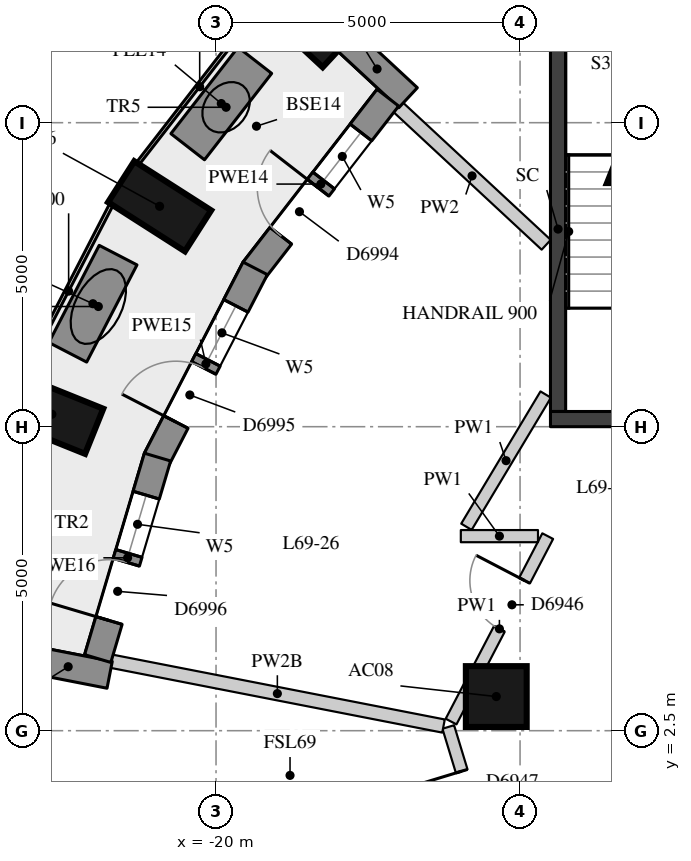
"""IFC4 building model, lengths in metres.
Left out: names, types, materials, properties, quantities, classifications, styles, units other than length and angle.
Written with IfcOpenShell. Run it as: python <this file> out.ifc"""

import sys

from ifc_helpers import new_model, si_unit, direction, frame, frame_2d, origin, origin_2d, place, context, subcontext, project, spatial, rectangle, extrude, element, fill, save


model = new_model("IFC4")
c1 = context("Model", 3, precision=1e-05, world=origin(), true_north=direction((0.0, 1.0)))
c2 = subcontext(c1, "Body", "Model", "MODEL_VIEW")
j1 = project(units=[si_unit("LENGTHUNIT", "METRE"), si_unit("PLANEANGLEUNIT", "RADIAN")], contexts=[c1])
p1 = place(None, origin())
s1 = spatial("IfcSite", under=j1, at=p1, CompositionType="ELEMENT")
p2 = place(p1, origin())
s2 = spatial("IfcBuilding", under=s1, at=p2, CompositionType="ELEMENT")
p3 = place(p2, frame((0.0, 0.0, 243.2)))
s3 = spatial("IfcBuildingStorey", under=s2, at=p3, CompositionType="ELEMENT", Elevation=243.2)
for number, where, z_axis, x_axis in (
    (1, (-18.523, 14.216, 0.0), (0.0, 0.0, 1.0), (-0.733, 0.681, 0.0)),
    (2, (-20.928, 11.125, 0.0), (0.0, 0.0, 1.0), (-0.843, 0.539, 0.0)),
    (3, (-22.7, 7.705, 0.0), (0.0, 0.0, 1.0), (-0.928, 0.374, 0.0)),
):
    element("IfcColumn", number, at=place(p3, frame(where, z_axis=z_axis, x_axis=x_axis)), inside=s3, PredefinedType="COLUMN", context=c2, shape_type="SweptSolid", body=[
        extrude(rectangle(XDim=1.5, YDim=0.8, at=origin_2d()), origin(), (0.0, 0.0, 1.0), 3.3),
    ])
p4 = place(p3, frame((-15.391, 3.062, 0.0), z_axis=(0.0, 0.0, 1.0), x_axis=(1.0, 0.0, 0.0)))
e4 = element("IfcColumn", 4, at=p4, inside=s3, PredefinedType="COLUMN", context=c2, shape_type="SweptSolid", body=[
    extrude(rectangle(XDim=1.0, YDim=1.0, at=origin_2d()), origin(), (0.0, 0.0, 1.0), 3.3),
])
p5 = place(p3, frame((-17.861, 13.857, 0.0), z_axis=(0.0, 0.0, 1.0), x_axis=(0.732605925603, -0.680653037731, 0.0)))
e5 = element("IfcWall", 5, at=p5, inside=s3, PredefinedType="SOLIDWALL", context=c2, shape_type="SweptSolid", body=[
    extrude(rectangle(XDim=1.391, YDim=0.45, at=frame_2d((0.695, 0.0))), origin(), (0.0, 0.0, 1.0), 3.02),
])
p6 = place(p3, frame((-23.114, 3.685, 0.0), z_axis=(0.0, 0.0, 1.0), x_axis=(0.981468844755, -0.191621780535, 0.0)))
e6 = element("IfcWall", 6, at=p6, inside=s3, PredefinedType="SOLIDWALL", context=c2, shape_type="SweptSolid", body=[
    extrude(rectangle(XDim=1.39, YDim=0.45, at=frame_2d((0.695, 0.0))), origin(), (0.0, 0.0, 1.0), 2.57),
])
p7 = place(p3, frame((-17.174, 12.911, 0.0), z_axis=(0.0, 0.0, 1.0), x_axis=(-0.612774197557, -0.79025804824, 0.0)))
e7 = element("IfcWall", 7, at=p7, inside=s3, PredefinedType="SOLIDWALL", context=c2, shape_type="SweptSolid", body=[
    extrude(rectangle(XDim=3.596, YDim=0.45, at=frame_2d((1.798, 0.0))), origin(), (0.0, 0.0, 1.0), 3.02),
])
p8 = place(p7, frame((0.723, 0.0, 0.4)))
e8 = element("IfcOpeningElement", 8, at=p8, cuts=e7, PredefinedType="OPENING", context=c2, shape_type="SweptSolid", body=[
    extrude(rectangle(XDim=1.0, YDim=1.75, at=frame_2d((0.5, 0.875))), frame((0.0, 0.235, 0.0), z_axis=(0.0, -1.0, 0.0), x_axis=(1.0, 0.0, 0.0)), (0.0, 0.0, 1.0), 0.47),
])
p9 = place(p7, frame((1.873, 0.0, 0.0)))
e9 = element("IfcOpeningElement", 9, at=p9, cuts=e7, PredefinedType="OPENING", context=c2, shape_type="SweptSolid", body=[
    extrude(rectangle(XDim=1.0, YDim=2.15, at=frame_2d((0.5, 1.075))), frame((0.0, 0.235, 0.0), z_axis=(0.0, -1.0, 0.0), x_axis=(1.0, 0.0, 0.0)), (0.0, 0.0, 1.0), 0.47),
])
p10 = place(p3, frame((-19.355, 10.104, 0.0), z_axis=(0.0, 0.0, 1.0), x_axis=(-0.458852093952, -0.888512665006, 0.0)))
e10 = element("IfcWall", 10, at=p10, inside=s3, PredefinedType="SOLIDWALL", context=c2, shape_type="SweptSolid", body=[
    extrude(rectangle(XDim=3.538, YDim=0.45, at=frame_2d((1.769, 0.0))), origin(), (0.0, 0.0, 1.0), 3.02),
])
p11 = place(p10, frame((0.694, 0.0, 0.4)))
e11 = element("IfcOpeningElement", 11, at=p11, cuts=e10, PredefinedType="OPENING", context=c2, shape_type="SweptSolid", body=[
    extrude(rectangle(XDim=1.0, YDim=1.75, at=frame_2d((0.5, 0.875))), frame((0.0, 0.235, 0.0), z_axis=(0.0, -1.0, 0.0), x_axis=(1.0, 0.0, 0.0)), (0.0, 0.0, 1.0), 0.47),
])
p12 = place(p10, frame((1.844, 0.0, 0.0)))
e12 = element("IfcOpeningElement", 12, at=p12, cuts=e10, PredefinedType="OPENING", context=c2, shape_type="SweptSolid", body=[
    extrude(rectangle(XDim=1.0, YDim=2.15, at=frame_2d((0.5, 1.075))), frame((0.0, 0.235, 0.0), z_axis=(0.0, -1.0, 0.0), x_axis=(1.0, 0.0, 0.0)), (0.0, 0.0, 1.0), 0.47),
])
p13 = place(p3, frame((-20.963, 7.0, 0.0), z_axis=(0.0, 0.0, 1.0), x_axis=(-0.284437019833, -0.958694728132, 0.0)))
e13 = element("IfcWall", 13, at=p13, inside=s3, PredefinedType="SOLIDWALL", context=c2, shape_type="SweptSolid", body=[
    extrude(rectangle(XDim=3.457, YDim=0.45, at=frame_2d((1.728, 0.0))), origin(), (0.0, 0.0, 1.0), 3.02),
])
p14 = place(p13, frame((0.653, 0.0, 0.4)))
e14 = element("IfcOpeningElement", 14, at=p14, cuts=e13, PredefinedType="OPENING", context=c2, shape_type="SweptSolid", body=[
    extrude(rectangle(XDim=1.0, YDim=1.75, at=frame_2d((0.5, 0.875))), frame((0.0, 0.235, 0.0), z_axis=(0.0, -1.0, 0.0), x_axis=(1.0, 0.0, 0.0)), (0.0, 0.0, 1.0), 0.47),
])
p15 = place(p13, frame((1.803, 0.0, 0.0)))
e15 = element("IfcOpeningElement", 15, at=p15, cuts=e13, PredefinedType="OPENING", context=c2, shape_type="SweptSolid", body=[
    extrude(rectangle(XDim=1.0, YDim=2.15, at=frame_2d((0.5, 1.075))), frame((0.0, 0.235, 0.0), z_axis=(0.0, -1.0, 0.0), x_axis=(1.0, 0.0, 0.0)), (0.0, 0.0, 1.0), 0.47),
])
for number, where, z_axis, x_axis in (
    (16, (-19.361, 13.525, 0.0), (0.0, 0.0, 1.0), (-0.614, -0.789, 0.0)),
    (17, (-21.611, 10.322, 0.0), (0.0, 0.0, 1.0), (-0.46, -0.888, 0.0)),
):
    element("IfcWall", number, at=place(p3, frame(where, z_axis=z_axis, x_axis=x_axis)), inside=s3, PredefinedType="USERDEFINED", context=c2, shape_type="SweptSolid", body=[
        extrude(rectangle(XDim=1.8, YDim=0.7, at=frame_2d((0.9, 0.0))), origin(), (0.0, 0.0, 1.0), 0.75),
    ])
p16 = place(p3, frame((-14.375, 7.75, -0.28), z_axis=(0.0, 0.0, 1.0), x_axis=(0.0, 1.0, 0.0)))
e18 = element("IfcWall", 18, at=p16, inside=s3, PredefinedType="SHEAR", context=c2, shape_type="SweptSolid", body=[
    extrude(rectangle(XDim=6.0, YDim=0.25, at=frame_2d((3.0, 0.0))), origin(), (0.0, 0.0, 1.0), 3.3),
])
p17 = place(p3, frame((-14.5, 7.625, -0.28), z_axis=(0.0, 0.0, 1.0), x_axis=(1.0, 0.0, 0.0)))
e19 = element("IfcWall", 19, at=p17, inside=s3, PredefinedType="SHEAR", context=c2, shape_type="SweptSolid", body=[
    extrude(rectangle(XDim=5.2, YDim=0.25, at=frame_2d((2.6, 0.0))), origin(), (0.0, 0.0, 1.0), 3.3),
])
p18 = place(p3, frame((-13.707, -5.567, 0.0), z_axis=(0.0, 0.0, 1.0), x_axis=(-0.29116047228, 0.956674228451, 0.0)))
e20 = element("IfcWall", 20, at=p18, inside=s3, PredefinedType="PARTITIONING", context=c2, shape_type="SweptSolid", body=[
    extrude(rectangle(XDim=8.496, YDim=0.2, at=frame_2d((4.248, 0.0))), origin(), (0.0, 0.0, 1.0), 3.02),
])
p19 = place(p18, frame((6.836, 0.0, 0.0)))
e21 = element("IfcOpeningElement", 21, at=p19, cuts=e20, PredefinedType="OPENING", context=c2, shape_type="SweptSolid", body=[
    extrude(rectangle(XDim=0.9, YDim=2.1, at=frame_2d((0.45, 1.05))), frame((0.0, 0.11, 0.0), z_axis=(0.0, -1.0, 0.0), x_axis=(1.0, 0.0, 0.0)), (0.0, 0.0, 1.0), 0.22),
])
p20 = place(p3, frame((-16.134, 2.65, 0.0), z_axis=(0.0, 0.0, 1.0), x_axis=(0.462143812638, 0.886804993468, 0.0)))
e22 = element("IfcWall", 22, at=p20, inside=s3, PredefinedType="PARTITIONING", context=c2, shape_type="SweptSolid", body=[
    extrude(rectangle(XDim=3.439, YDim=0.2, at=frame_2d((1.72, 0.0))), origin(), (0.0, 0.0, 1.0), 3.02),
])
p21 = place(p20, frame((1.716, 0.0, 0.0)))
e23 = element("IfcOpeningElement", 23, at=p21, cuts=e22, PredefinedType="OPENING", context=c2, shape_type="SweptSolid", body=[
    extrude(rectangle(XDim=0.9, YDim=2.1, at=frame_2d((0.45, 1.05))), frame((0.0, 0.11, 0.0), z_axis=(0.0, -1.0, 0.0), x_axis=(1.0, 0.0, 0.0)), (0.0, 0.0, 1.0), 0.22),
])
p22 = place(p3, frame((-14.705, 5.7, 0.0), z_axis=(0.0, 0.0, 1.0), x_axis=(-1.0, 0.0, 0.0)))
e24 = element("IfcWall", 24, at=p22, inside=s3, PredefinedType="PARTITIONING", context=c2, shape_type="SweptSolid", body=[
    extrude(rectangle(XDim=1.269, YDim=0.2, at=frame_2d((0.635, 0.0))), origin(), (0.0, 0.0, 1.0), 3.02),
])
p23 = place(p3, frame((-15.882, 5.854, 0.0), z_axis=(0.0, 0.0, 1.0), x_axis=(0.514042598012, 0.857764657368, 0.0)))
e25 = element("IfcWall", 25, at=p23, inside=s3, PredefinedType="PARTITIONING", context=c2, shape_type="SweptSolid", body=[
    extrude(rectangle(XDim=2.536, YDim=0.2, at=frame_2d((1.268, 0.0))), origin(), (0.0, 0.0, 1.0), 3.02),
])
p24 = place(p3, frame((-17.009, 12.758, 0.0), z_axis=(0.0, 0.0, 1.0), x_axis=(0.732631495403, -0.680625515202, 0.0)))
e26 = element("IfcWall", 26, at=p24, inside=s3, PredefinedType="PARTITIONING", context=c2, shape_type="SweptSolid", body=[
    extrude(rectangle(XDim=3.328, YDim=0.22, at=frame_2d((1.664, 0.0))), origin(), (0.0, 0.0, 1.0), 3.02),
])
p25 = place(p3, frame((-21.724, 3.643, 0.0), z_axis=(0.0, 0.0, 1.0), x_axis=(0.981482350032, -0.191552594804, 0.0)))
e27 = element("IfcWall", 27, at=p25, inside=s3, PredefinedType="PARTITIONING", context=c2, shape_type="SweptSolid", body=[
    extrude(rectangle(XDim=5.568, YDim=0.22, at=frame_2d((2.784, 0.0))), origin(), (0.0, 0.0, 1.0), 2.57),
])
p26 = place(p3, frame((-13.554, 0.0, 0.0), z_axis=(0.0, 0.0, 1.0), x_axis=(0.382730523909, 0.923860025149, 0.0)))
e28 = element("IfcWall", 28, at=p26, inside=s3, PredefinedType="PARTITIONING", context=c2, shape_type="SweptSolid", body=[
    extrude(rectangle(XDim=4.251, YDim=0.1, at=frame_2d((2.125, 0.0))), origin(), (0.0, 0.0, 1.0), 3.02),
])
p27 = place(p8, origin())
e29 = element("IfcWindow", 29, at=p27, inside=s3, PartitioningType="SINGLE_PANEL", PredefinedType="WINDOW", context=c2, shape_type="SweptSolid", body=[
    extrude(rectangle(XDim=1.0, YDim=1.75, at=frame_2d((0.5, 0.875))), frame((0.0, 0.035, 0.0), z_axis=(0.0, -1.0, 0.0), x_axis=(1.0, 0.0, 0.0)), (0.0, 0.0, 1.0), 0.06),
])
fill(e8, e29)
p28 = place(p9, frame((1.0, 0.0, 0.0), z_axis=(0.0, 0.0, 1.0), x_axis=(-1.0, 0.0, 0.0)))
e30 = element("IfcDoor", 30, at=p28, inside=s3, OperationType="SINGLE_SWING_RIGHT", PredefinedType="DOOR", context=c2, shape_type="SweptSolid", body=[
    extrude(rectangle(XDim=1.0, YDim=2.15, at=frame_2d((0.5, 1.075))), frame((0.0, 0.075, 0.0), z_axis=(0.0, -1.0, 0.0), x_axis=(1.0, 0.0, 0.0)), (0.0, 0.0, 1.0), 0.05),
])
fill(e9, e30)
p29 = place(p11, origin())
e31 = element("IfcWindow", 31, at=p29, inside=s3, PartitioningType="SINGLE_PANEL", PredefinedType="WINDOW", context=c2, shape_type="SweptSolid", body=[
    extrude(rectangle(XDim=1.0, YDim=1.75, at=frame_2d((0.5, 0.875))), frame((0.0, 0.035, 0.0), z_axis=(0.0, -1.0, 0.0), x_axis=(1.0, 0.0, 0.0)), (0.0, 0.0, 1.0), 0.06),
])
fill(e11, e31)
p30 = place(p12, frame((1.0, 0.0, 0.0), z_axis=(0.0, 0.0, 1.0), x_axis=(-1.0, 0.0, 0.0)))
e32 = element("IfcDoor", 32, at=p30, inside=s3, OperationType="SINGLE_SWING_LEFT", PredefinedType="DOOR", context=c2, shape_type="SweptSolid", body=[
    extrude(rectangle(XDim=1.0, YDim=2.15, at=frame_2d((0.5, 1.075))), frame((0.0, 0.075, 0.0), z_axis=(0.0, -1.0, 0.0), x_axis=(1.0, 0.0, 0.0)), (0.0, 0.0, 1.0), 0.05),
])
fill(e12, e32)
p31 = place(p14, origin())
e33 = element("IfcWindow", 33, at=p31, inside=s3, PartitioningType="SINGLE_PANEL", PredefinedType="WINDOW", context=c2, shape_type="SweptSolid", body=[
    extrude(rectangle(XDim=1.0, YDim=1.75, at=frame_2d((0.5, 0.875))), frame((0.0, 0.035, 0.0), z_axis=(0.0, -1.0, 0.0), x_axis=(1.0, 0.0, 0.0)), (0.0, 0.0, 1.0), 0.06),
])
fill(e14, e33)
p32 = place(p15, frame((1.0, 0.0, 0.0), z_axis=(0.0, 0.0, 1.0), x_axis=(-1.0, 0.0, 0.0)))
e34 = element("IfcDoor", 34, at=p32, inside=s3, OperationType="SINGLE_SWING_LEFT", PredefinedType="DOOR", context=c2, shape_type="SweptSolid", body=[
    extrude(rectangle(XDim=1.0, YDim=2.15, at=frame_2d((0.5, 1.075))), frame((0.0, 0.075, 0.0), z_axis=(0.0, -1.0, 0.0), x_axis=(1.0, 0.0, 0.0)), (0.0, 0.0, 1.0), 0.05),
])
fill(e15, e34)
p33 = place(p21, origin())
e35 = element("IfcDoor", 35, at=p33, inside=s3, OperationType="SINGLE_SWING_RIGHT", PredefinedType="DOOR", context=c2, shape_type="SweptSolid", body=[
    extrude(rectangle(XDim=0.9, YDim=2.1, at=frame_2d((0.45, 1.05))), frame((0.0, 0.025, 0.0), z_axis=(0.0, -1.0, 0.0), x_axis=(1.0, 0.0, 0.0)), (0.0, 0.0, 1.0), 0.05),
])
fill(e23, e35)
p34 = place(p19, origin())
e36 = element("IfcDoor", 36, at=p34, inside=s3, OperationType="SINGLE_SWING_RIGHT", PredefinedType="DOOR", context=c2, shape_type="SweptSolid", body=[
    extrude(rectangle(XDim=0.9, YDim=2.1, at=frame_2d((0.45, 1.05))), frame((0.0, 0.025, 0.0), z_axis=(0.0, -1.0, 0.0), x_axis=(1.0, 0.0, 0.0)), (0.0, 0.0, 1.0), 0.05),
])
fill(e21, e36)
save(model, sys.argv[1])
